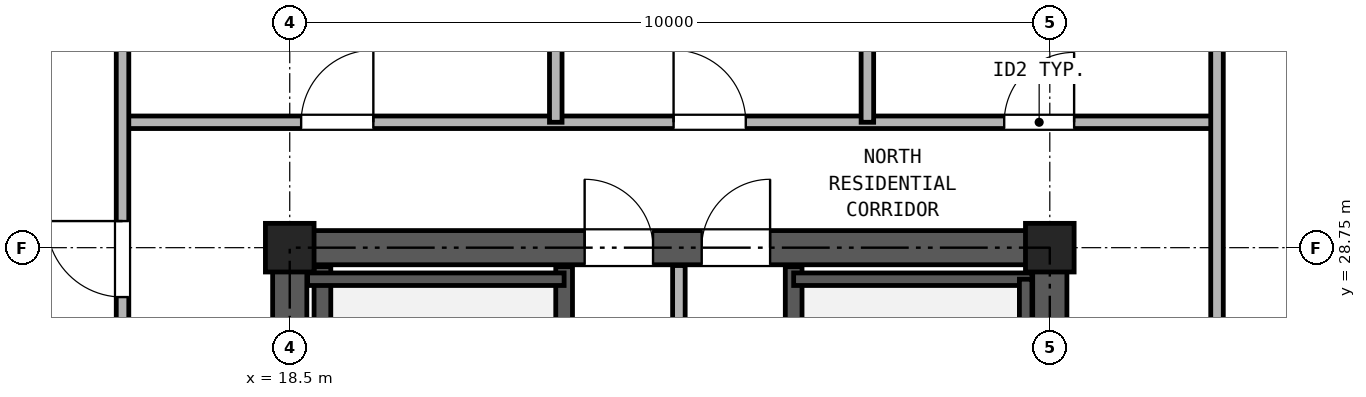
"""IFC4 building model, lengths in metres.
Left out: names, types, materials, properties, quantities, classifications, styles, units other than length and angle.
Written with IfcOpenShell. Run it as: python <this file> out.ifc"""

import sys

from ifc_helpers import new_model, si_unit, direction, frame, frame_2d, origin, origin_2d, place, context, subcontext, project, spatial, rectangle, hollow_rectangle, extrude, source, transform, mapped, element, fill, save


model = new_model("IFC4")
c1 = context("Model", 3, precision=1e-05, world=origin(), true_north=direction((0.0, 1.0)))
c2 = subcontext(c1, "Body", "Model", "MODEL_VIEW")
j1 = project(units=[si_unit("LENGTHUNIT", "METRE"), si_unit("PLANEANGLEUNIT", "RADIAN")], contexts=[c1])
p1 = place(None, origin())
s1 = spatial("IfcSite", under=j1, at=p1, CompositionType="ELEMENT")
p2 = place(p1, origin())
s2 = spatial("IfcBuilding", under=s1, at=p2, CompositionType="ELEMENT")
p3 = place(p2, frame((0.0, 0.0, 159.3)))
s3 = spatial("IfcBuildingStorey", under=s2, at=p3, CompositionType="ELEMENT", Elevation=159.3)
m1 = source(origin(), c2, "Body", "SweptSolid", [
    extrude(hollow_rectangle(XDim=0.64, YDim=0.64, WallThickness=0.035, at=origin_2d()), origin(), (0.0, 0.0, 1.0), 2.95),
])
for number, where, z_axis, x_axis in (
    (1, (18.5, 28.75, 0.0), (0.0, 0.0, 1.0), (1.0, 0.0, 0.0)),
    (2, (28.5, 28.75, 0.0), (0.0, 0.0, 1.0), (1.0, 0.0, 0.0)),
):
    element("IfcColumn", number, at=place(p3, frame(where, z_axis=z_axis, x_axis=x_axis)), inside=s3, PredefinedType="COLUMN", context=c2, shape_type="MappedRepresentation", body=[
        mapped(m1, transform((0.0, 0.0, 0.0), x_axis=(1.0, 0.0, 0.0), y_axis=(0.0, 1.0, 0.0), z_axis=(0.0, 0.0, 1.0), scale=1.0)),
    ])
p4 = place(p3, frame((18.275, 28.75, 0.0), z_axis=(0.0, 0.0, 1.0), x_axis=(1.0, 0.0, 0.0)))
e3 = element("IfcWall", 3, at=p4, inside=s3, PredefinedType="SHEAR", context=c2, shape_type="SweptSolid", body=[
    extrude(rectangle(XDim=10.45, YDim=0.45, at=frame_2d((5.225, 0.0))), origin(), (0.0, 0.0, 1.0), 2.95),
])
p5 = place(p4, frame((4.105, 0.0, 0.0)))
e4 = element("IfcOpeningElement", 4, at=p5, cuts=e3, PredefinedType="OPENING", context=c2, shape_type="SweptSolid", body=[
    extrude(rectangle(XDim=0.9, YDim=2.05, at=frame_2d((0.45, 1.025))), frame((0.0, 0.235, 0.0), z_axis=(0.0, -1.0, 0.0), x_axis=(1.0, 0.0, 0.0)), (0.0, 0.0, 1.0), 0.47),
])
p6 = place(p4, frame((5.645, 0.0, 0.0)))
e5 = element("IfcOpeningElement", 5, at=p6, cuts=e3, PredefinedType="OPENING", context=c2, shape_type="SweptSolid", body=[
    extrude(rectangle(XDim=0.9, YDim=2.05, at=frame_2d((0.45, 1.025))), frame((0.0, 0.235, 0.0), z_axis=(0.0, -1.0, 0.0), x_axis=(1.0, 0.0, 0.0)), (0.0, 0.0, 1.0), 0.47),
])
p7 = place(p3, frame((18.5, 11.725, 0.0), z_axis=(0.0, 0.0, 1.0), x_axis=(0.0, 1.0, 0.0)))
e6 = element("IfcWall", 6, at=p7, inside=s3, PredefinedType="SHEAR", context=c2, shape_type="SweptSolid", body=[
    extrude(rectangle(XDim=16.8, YDim=0.45, at=frame_2d((8.4, 0.0))), origin(), (0.0, 0.0, 1.0), 2.95),
])
p8 = place(p7, frame((7.425, 0.0, 0.0)))
e7 = element("IfcOpeningElement", 7, at=p8, cuts=e6, PredefinedType="OPENING", context=c2, shape_type="SweptSolid", body=[
    extrude(rectangle(XDim=1.15, YDim=2.2, at=frame_2d((0.575, 1.1))), frame((0.0, 0.235, 0.0), z_axis=(0.0, -1.0, 0.0), x_axis=(1.0, 0.0, 0.0)), (0.0, 0.0, 1.0), 0.47),
])
p9 = place(p3, frame((28.5, 11.725, 0.0), z_axis=(0.0, 0.0, 1.0), x_axis=(0.0, 1.0, 0.0)))
e8 = element("IfcWall", 8, at=p9, inside=s3, PredefinedType="SHEAR", context=c2, shape_type="SweptSolid", body=[
    extrude(rectangle(XDim=16.8, YDim=0.45, at=frame_2d((8.4, 0.0))), origin(), (0.0, 0.0, 1.0), 2.95),
])
p10 = place(p9, frame((7.425, 0.0, 0.0)))
e9 = element("IfcOpeningElement", 9, at=p10, cuts=e8, PredefinedType="OPENING", context=c2, shape_type="SweptSolid", body=[
    extrude(rectangle(XDim=1.15, YDim=2.2, at=frame_2d((0.575, 1.1))), frame((0.0, 0.235, 0.0), z_axis=(0.0, -1.0, 0.0), x_axis=(1.0, 0.0, 0.0)), (0.0, 0.0, 1.0), 0.47),
])
for number, where, z_axis, x_axis in (
    (10, (18.93, 21.39, 0.0), (0.0, 0.0, 1.0), (0.0, 1.0, 0.0)),
    (11, (22.11, 21.39, 0.0), (0.0, 0.0, 1.0), (0.0, 1.0, 0.0)),
    (12, (25.13, 21.39, 0.0), (0.0, 0.0, 1.0), (0.0, 1.0, 0.0)),
):
    element("IfcWall", number, at=place(p3, frame(where, z_axis=z_axis, x_axis=x_axis)), inside=s3, PredefinedType="SOLIDWALL", context=c2, shape_type="SweptSolid", body=[
        extrude(rectangle(XDim=7.11, YDim=0.22, at=frame_2d((3.555, 0.0))), origin(), (0.0, 0.0, 1.0), 2.95),
    ])
p11 = place(p3, frame((18.735, 28.335, 0.0), z_axis=(0.0, 0.0, 1.0), x_axis=(1.0, 0.0, 0.0)))
e13 = element("IfcWall", 13, at=p11, inside=s3, PredefinedType="PARTITIONING", context=c2, shape_type="SweptSolid", body=[
    extrude(rectangle(XDim=3.375, YDim=0.165, at=frame_2d((1.688, 0.0))), origin(), (0.0, 0.0, 1.0), 2.95),
])
p12 = place(p3, frame((25.13, 28.335, 0.0), z_axis=(0.0, 0.0, 1.0), x_axis=(1.0, 0.0, 0.0)))
e14 = element("IfcWall", 14, at=p12, inside=s3, PredefinedType="PARTITIONING", context=c2, shape_type="SweptSolid", body=[
    extrude(rectangle(XDim=3.135, YDim=0.165, at=frame_2d((1.567, 0.0))), origin(), (0.0, 0.0, 1.0), 2.95),
])
p13 = place(p3, frame((28.183, 21.39, 0.0), z_axis=(0.0, 0.0, 1.0), x_axis=(0.0, 1.0, 0.0)))
e15 = element("IfcWall", 15, at=p13, inside=s3, PredefinedType="PARTITIONING", context=c2, shape_type="SweptSolid", body=[
    extrude(rectangle(XDim=6.945, YDim=0.165, at=frame_2d((3.473, 0.0))), origin(), (0.0, 0.0, 1.0), 2.95),
])
p14 = place(p3, frame((23.62, 24.4, 0.0), z_axis=(0.0, 0.0, 1.0), x_axis=(0.0, 1.0, 0.0)))
e16 = element("IfcWall", 16, at=p14, inside=s3, PredefinedType="PARTITIONING", context=c2, shape_type="SweptSolid", body=[
    extrude(rectangle(XDim=4.115, YDim=0.165, at=frame_2d((2.058, 0.0))), origin(), (0.0, 0.0, 1.0), 2.95),
])
p15 = place(p3, frame((16.3, 30.4, 0.0), z_axis=(0.0, 0.0, 1.0), x_axis=(1.0, 0.0, 0.0)))
e17 = element("IfcWall", 17, at=p15, inside=s3, PredefinedType="PARTITIONING", context=c2, shape_type="SweptSolid", body=[
    extrude(rectangle(XDim=14.4, YDim=0.165, at=frame_2d((7.2, 0.0))), origin(), (0.0, 0.0, 1.0), 2.95),
])
p16 = place(p15, frame((2.35, 0.0, 0.0)))
e18 = element("IfcOpeningElement", 18, at=p16, cuts=e17, PredefinedType="OPENING", context=c2, shape_type="SweptSolid", body=[
    extrude(rectangle(XDim=0.95, YDim=2.15, at=frame_2d((0.475, 1.075))), frame((0.0, 0.093, 0.0), z_axis=(0.0, -1.0, 0.0), x_axis=(1.0, 0.0, 0.0)), (0.0, 0.0, 1.0), 0.185),
])
p17 = place(p15, frame((7.25, 0.0, 0.0)))
e19 = element("IfcOpeningElement", 19, at=p17, cuts=e17, PredefinedType="OPENING", context=c2, shape_type="SweptSolid", body=[
    extrude(rectangle(XDim=0.95, YDim=2.15, at=frame_2d((0.475, 1.075))), frame((0.0, 0.093, 0.0), z_axis=(0.0, -1.0, 0.0), x_axis=(1.0, 0.0, 0.0)), (0.0, 0.0, 1.0), 0.185),
])
p18 = place(p15, frame((11.6, 0.0, 0.0)))
e20 = element("IfcOpeningElement", 20, at=p18, cuts=e17, PredefinedType="OPENING", context=c2, shape_type="SweptSolid", body=[
    extrude(rectangle(XDim=0.92, YDim=2.1, at=frame_2d((0.46, 1.05))), frame((0.0, 0.093, 0.0), z_axis=(0.0, -1.0, 0.0), x_axis=(1.0, 0.0, 0.0)), (0.0, 0.0, 1.0), 0.185),
])
p19 = place(p3, frame((16.3, 10.9, 0.0), z_axis=(0.0, 0.0, 1.0), x_axis=(0.0, 1.0, 0.0)))
e21 = element("IfcWall", 21, at=p19, inside=s3, PredefinedType="PARTITIONING", context=c2, shape_type="SweptSolid", body=[
    extrude(rectangle(XDim=24.24, YDim=0.165, at=frame_2d((12.12, 0.0))), origin(), (0.0, 0.0, 1.0), 2.95),
])
p20 = place(p19, frame((3.3, 0.0, 0.0)))
e22 = element("IfcOpeningElement", 22, at=p20, cuts=e21, PredefinedType="OPENING", context=c2, shape_type="SweptSolid", body=[
    extrude(rectangle(XDim=1.0, YDim=2.15, at=frame_2d((0.5, 1.075))), frame((0.0, 0.093, 0.0), z_axis=(0.0, -1.0, 0.0), x_axis=(1.0, 0.0, 0.0)), (0.0, 0.0, 1.0), 0.185),
])
p21 = place(p19, frame((11.25, 0.0, 0.0)))
e23 = element("IfcOpeningElement", 23, at=p21, cuts=e21, PredefinedType="OPENING", context=c2, shape_type="SweptSolid", body=[
    extrude(rectangle(XDim=1.0, YDim=2.15, at=frame_2d((0.5, 1.075))), frame((0.0, 0.093, 0.0), z_axis=(0.0, -1.0, 0.0), x_axis=(1.0, 0.0, 0.0)), (0.0, 0.0, 1.0), 0.185),
])
p22 = place(p19, frame((17.2, 0.0, 0.0)))
e24 = element("IfcOpeningElement", 24, at=p22, cuts=e21, PredefinedType="OPENING", context=c2, shape_type="SweptSolid", body=[
    extrude(rectangle(XDim=1.0, YDim=2.15, at=frame_2d((0.5, 1.075))), frame((0.0, 0.093, 0.0), z_axis=(0.0, -1.0, 0.0), x_axis=(1.0, 0.0, 0.0)), (0.0, 0.0, 1.0), 0.185),
])
p23 = place(p3, frame((30.7, 10.9, 0.0), z_axis=(0.0, 0.0, 1.0), x_axis=(0.0, 1.0, 0.0)))
e25 = element("IfcWall", 25, at=p23, inside=s3, PredefinedType="PARTITIONING", context=c2, shape_type="SweptSolid", body=[
    extrude(rectangle(XDim=24.24, YDim=0.165, at=frame_2d((12.12, 0.0))), origin(), (0.0, 0.0, 1.0), 2.95),
])
p24 = place(p23, frame((5.3, 0.0, 0.0)))
e26 = element("IfcOpeningElement", 26, at=p24, cuts=e25, PredefinedType="OPENING", context=c2, shape_type="SweptSolid", body=[
    extrude(rectangle(XDim=1.0, YDim=2.15, at=frame_2d((0.5, 1.075))), frame((0.0, 0.093, 0.0), z_axis=(0.0, -1.0, 0.0), x_axis=(1.0, 0.0, 0.0)), (0.0, 0.0, 1.0), 0.185),
])
p25 = place(p23, frame((15.05, 0.0, 0.0)))
e27 = element("IfcOpeningElement", 27, at=p25, cuts=e25, PredefinedType="OPENING", context=c2, shape_type="SweptSolid", body=[
    extrude(rectangle(XDim=1.0, YDim=2.15, at=frame_2d((0.5, 1.075))), frame((0.0, 0.093, 0.0), z_axis=(0.0, -1.0, 0.0), x_axis=(1.0, 0.0, 0.0)), (0.0, 0.0, 1.0), 0.185),
])
for number, where, z_axis, x_axis in (
    (28, (22.0, 30.4, 0.0), (0.0, 0.0, 1.0), (0.0, 1.0, 0.0)),
    (29, (26.1, 30.4, 0.0), (0.0, 0.0, 1.0), (0.0, 1.0, 0.0)),
):
    element("IfcWall", number, at=place(p3, frame(where, z_axis=z_axis, x_axis=x_axis)), inside=s3, PredefinedType="PARTITIONING", context=c2, shape_type="SweptSolid", body=[
        extrude(rectangle(XDim=4.74, YDim=0.165, at=frame_2d((2.37, 0.0))), origin(), (0.0, 0.0, 1.0), 2.95),
    ])
p26 = place(p5, origin())
e30 = element("IfcDoor", 30, at=p26, inside=s3, OperationType="SINGLE_SWING_LEFT", PredefinedType="DOOR", context=c2, shape_type="SweptSolid", body=[
    extrude(rectangle(XDim=0.9, YDim=2.05, at=frame_2d((0.45, 1.025))), frame((0.0, 0.025, 0.0), z_axis=(0.0, -1.0, 0.0), x_axis=(1.0, 0.0, 0.0)), (0.0, 0.0, 1.0), 0.05),
])
fill(e4, e30)
p27 = place(p6, origin())
e31 = element("IfcDoor", 31, at=p27, inside=s3, OperationType="SINGLE_SWING_RIGHT", PredefinedType="DOOR", context=c2, shape_type="SweptSolid", body=[
    extrude(rectangle(XDim=0.9, YDim=2.05, at=frame_2d((0.45, 1.025))), frame((0.0, 0.025, 0.0), z_axis=(0.0, -1.0, 0.0), x_axis=(1.0, 0.0, 0.0)), (0.0, 0.0, 1.0), 0.05),
])
fill(e5, e31)
p28 = place(p22, origin())
e32 = element("IfcDoor", 32, at=p28, inside=s3, OperationType="SINGLE_SWING_RIGHT", PredefinedType="DOOR", context=c2, shape_type="SweptSolid", body=[
    extrude(rectangle(XDim=1.0, YDim=2.15, at=frame_2d((0.5, 1.075))), frame((0.0, 0.025, 0.0), z_axis=(0.0, -1.0, 0.0), x_axis=(1.0, 0.0, 0.0)), (0.0, 0.0, 1.0), 0.05),
])
fill(e24, e32)
p29 = place(p16, origin())
e33 = element("IfcDoor", 33, at=p29, inside=s3, OperationType="SINGLE_SWING_RIGHT", PredefinedType="DOOR", context=c2, shape_type="SweptSolid", body=[
    extrude(rectangle(XDim=0.95, YDim=2.15, at=frame_2d((0.475, 1.075))), frame((0.0, 0.025, 0.0), z_axis=(0.0, -1.0, 0.0), x_axis=(1.0, 0.0, 0.0)), (0.0, 0.0, 1.0), 0.05),
])
fill(e18, e33)
p30 = place(p17, origin())
e34 = element("IfcDoor", 34, at=p30, inside=s3, OperationType="SINGLE_SWING_LEFT", PredefinedType="DOOR", context=c2, shape_type="SweptSolid", body=[
    extrude(rectangle(XDim=0.95, YDim=2.15, at=frame_2d((0.475, 1.075))), frame((0.0, 0.025, 0.0), z_axis=(0.0, -1.0, 0.0), x_axis=(1.0, 0.0, 0.0)), (0.0, 0.0, 1.0), 0.05),
])
fill(e19, e34)
p31 = place(p18, origin())
e35 = element("IfcDoor", 35, at=p31, inside=s3, OperationType="SINGLE_SWING_RIGHT", PredefinedType="DOOR", context=c2, shape_type="SweptSolid", body=[
    extrude(rectangle(XDim=0.92, YDim=2.1, at=frame_2d((0.46, 1.05))), frame((0.0, 0.025, 0.0), z_axis=(0.0, -1.0, 0.0), x_axis=(1.0, 0.0, 0.0)), (0.0, 0.0, 1.0), 0.05),
])
fill(e20, e35)
save(model, sys.argv[1])
